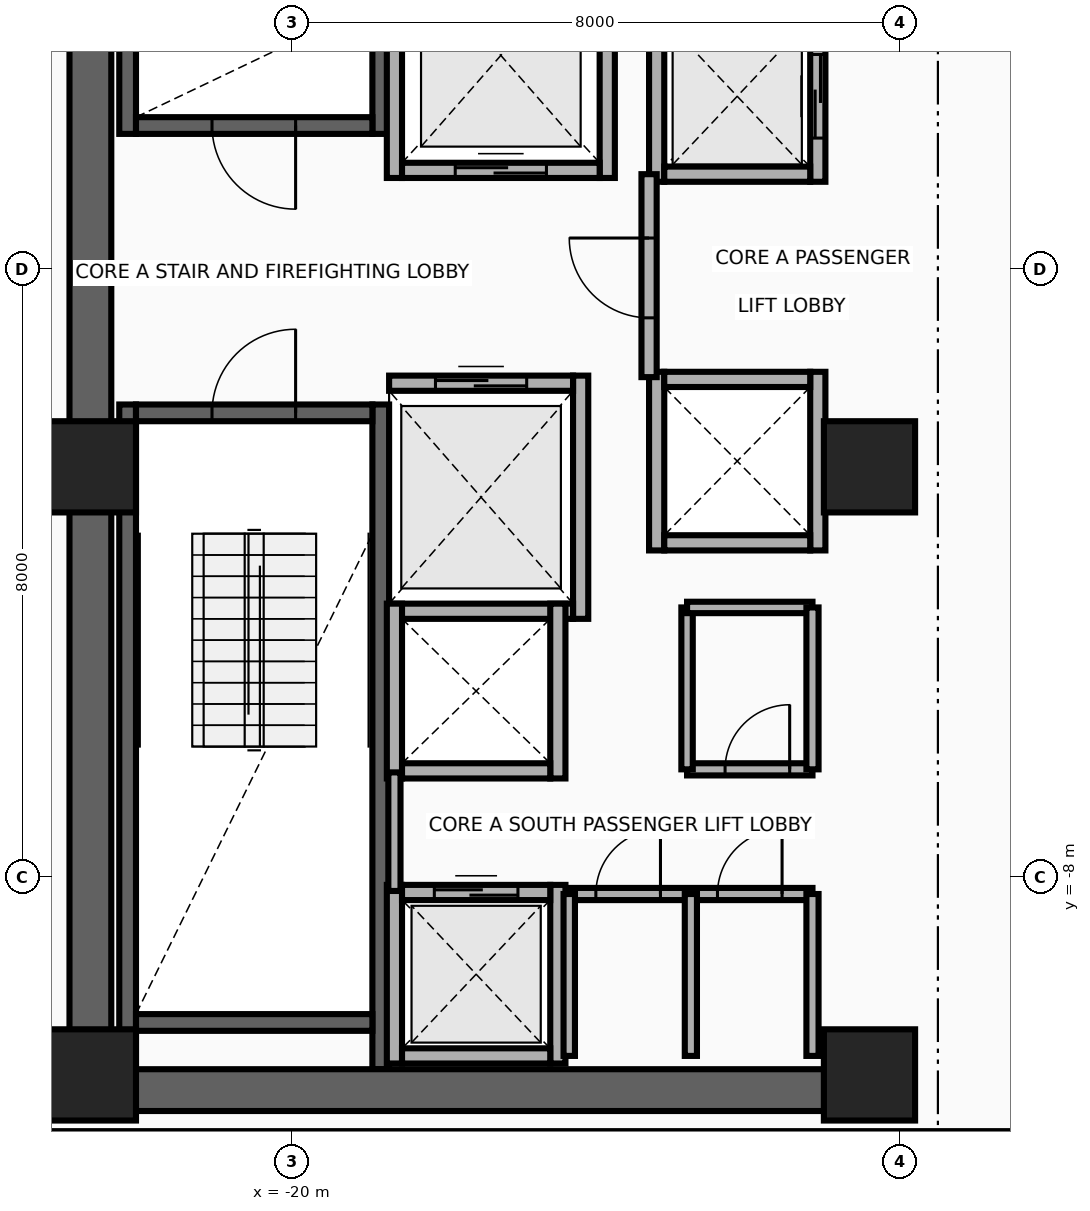
"""IFC4 building model, lengths in metres.
Left out: names, types, materials, properties, quantities, classifications, styles, units other than length and angle.
Written with IfcOpenShell. Run it as: python <this file> out.ifc"""

import sys

from ifc_helpers import new_model, si_unit, direction, frame, frame_2d, origin, origin_2d, place, context, subcontext, project, spatial, rectangle, extrude, source, transform, mapped, element, fill, save


model = new_model("IFC4")
c1 = context("Model", 3, precision=1e-05, world=origin(), true_north=direction((0.0, 1.0)))
c2 = subcontext(c1, "Body", "Model", "MODEL_VIEW")
j1 = project(units=[si_unit("LENGTHUNIT", "METRE"), si_unit("PLANEANGLEUNIT", "RADIAN")], contexts=[c1])
p1 = place(None, origin())
s1 = spatial("IfcSite", under=j1, at=p1, CompositionType="ELEMENT")
p2 = place(p1, origin())
s2 = spatial("IfcBuilding", under=s1, at=p2, CompositionType="ELEMENT")
p3 = place(p2, frame((0.0, 0.0, 168.6)))
s3 = spatial("IfcBuildingStorey", under=s2, at=p3, CompositionType="ELEMENT", Elevation=168.6)
for number, where, z_axis, x_axis in (
    (1, (-22.16, 1.78, 0.0), (0.0, 0.0, 1.0), (0.0, 1.0, 0.0)),
    (2, (-18.83, 1.78, 0.0), (0.0, 0.0, 1.0), (0.0, 1.0, 0.0)),
):
    element("IfcWall", number, at=place(p3, frame(where, z_axis=z_axis, x_axis=x_axis)), inside=s3, PredefinedType="SHEAR", context=c2, shape_type="SweptSolid", body=[
        extrude(rectangle(XDim=8.745, YDim=0.22, at=frame_2d((4.373, 0.0))), origin(), (0.0, 0.0, 1.0), 3.3),
    ])
p4 = place(p3, frame((-22.05, 1.89, 0.0), z_axis=(0.0, 0.0, 1.0), x_axis=(1.0, 0.0, 0.0)))
e3 = element("IfcWall", 3, at=p4, inside=s3, PredefinedType="SHEAR", context=c2, shape_type="SweptSolid", body=[
    extrude(rectangle(XDim=3.11, YDim=0.22, at=frame_2d((1.555, 0.0))), origin(), (0.0, 0.0, 1.0), 3.3),
])
p5 = place(p4, frame((1.0, 0.0, 0.0)))
e4 = element("IfcOpeningElement", 4, at=p5, cuts=e3, PredefinedType="OPENING", context=c2, shape_type="SweptSolid", body=[
    extrude(rectangle(XDim=1.1, YDim=2.15, at=frame_2d((0.55, 1.075))), frame((0.0, 0.125, 0.0), z_axis=(0.0, -1.0, 0.0), x_axis=(1.0, 0.0, 0.0)), (0.0, 0.0, 1.0), 0.25),
])
for number, where, z_axis, x_axis in (
    (5, (-22.16, -10.525, 0.0), (0.0, 0.0, 1.0), (0.0, 1.0, 0.0)),
    (6, (-18.83, -10.525, 0.0), (0.0, 0.0, 1.0), (0.0, 1.0, 0.0)),
):
    element("IfcWall", number, at=place(p3, frame(where, z_axis=z_axis, x_axis=x_axis)), inside=s3, PredefinedType="SHEAR", context=c2, shape_type="SweptSolid", body=[
        extrude(rectangle(XDim=8.745, YDim=0.22, at=frame_2d((4.373, 0.0))), origin(), (0.0, 0.0, 1.0), 3.3),
    ])
p6 = place(p3, frame((-22.05, -9.91, 0.0), z_axis=(0.0, 0.0, 1.0), x_axis=(1.0, 0.0, 0.0)))
e7 = element("IfcWall", 7, at=p6, inside=s3, PredefinedType="SHEAR", context=c2, shape_type="SweptSolid", body=[
    extrude(rectangle(XDim=3.11, YDim=0.22, at=frame_2d((1.555, 0.0))), origin(), (0.0, 0.0, 1.0), 3.3),
])
p7 = place(p3, frame((-22.05, -1.89, 0.0), z_axis=(0.0, 0.0, 1.0), x_axis=(1.0, 0.0, 0.0)))
e8 = element("IfcWall", 8, at=p7, inside=s3, PredefinedType="SHEAR", context=c2, shape_type="SweptSolid", body=[
    extrude(rectangle(XDim=3.11, YDim=0.22, at=frame_2d((1.555, 0.0))), origin(), (0.0, 0.0, 1.0), 3.3),
])
p8 = place(p7, frame((1.0, 0.0, 0.0)))
e9 = element("IfcOpeningElement", 9, at=p8, cuts=e8, PredefinedType="OPENING", context=c2, shape_type="SweptSolid", body=[
    extrude(rectangle(XDim=1.1, YDim=2.15, at=frame_2d((0.55, 1.075))), frame((0.0, 0.125, 0.0), z_axis=(0.0, -1.0, 0.0), x_axis=(1.0, 0.0, 0.0)), (0.0, 0.0, 1.0), 0.25),
])
p9 = place(p3, frame((-22.65, -11.075, 0.0), z_axis=(0.0, 0.0, 1.0), x_axis=(0.0, 1.0, 0.0)))
e10 = element("IfcWall", 10, at=p9, inside=s3, PredefinedType="SHEAR", context=c2, shape_type="SweptSolid", body=[
    extrude(rectangle(XDim=22.15, YDim=0.55, at=frame_2d((11.075, 0.0))), origin(), (0.0, 0.0, 1.0), 3.3),
])
p10 = place(p3, frame((-22.65, -10.8, 0.0), z_axis=(0.0, 0.0, 1.0), x_axis=(1.0, 0.0, 0.0)))
e11 = element("IfcWall", 11, at=p10, inside=s3, PredefinedType="SHEAR", context=c2, shape_type="SweptSolid", body=[
    extrude(rectangle(XDim=10.25, YDim=0.55, at=frame_2d((5.125, 0.0))), origin(), (0.0, 0.0, 1.0), 3.3),
])
m1 = source(origin(), c2, "Body", "SweptSolid", [
    extrude(rectangle(XDim=1.2, YDim=1.2, at=origin_2d()), origin(), (0.0, 0.0, 1.0), 3.7),
])
for number, where, z_axis, x_axis in (
    (12, (-22.65, -10.6, 0.0), (0.0, 0.0, 1.0), (1.0, 0.0, 0.0)),
    (13, (-12.4, -10.6, 0.0), (0.0, 0.0, 1.0), (1.0, 0.0, 0.0)),
    (14, (-22.65, -2.6, 0.0), (0.0, 0.0, 1.0), (1.0, 0.0, 0.0)),
    (15, (-12.4, -2.6, 0.0), (0.0, 0.0, 1.0), (1.0, 0.0, 0.0)),
):
    element("IfcColumn", number, at=place(p3, frame(where, z_axis=z_axis, x_axis=x_axis)), inside=s3, PredefinedType="COLUMN", context=c2, shape_type="MappedRepresentation", body=[
        mapped(m1, transform((0.0, 0.0, 0.0), x_axis=(1.0, 0.0, 0.0), y_axis=(0.0, 1.0, 0.0), z_axis=(0.0, 0.0, 1.0), scale=1.0)),
    ])
for number, where, z_axis, x_axis in (
    (16, (-18.65, 1.2, 0.0), (0.0, 0.0, 1.0), (0.0, 1.0, 0.0)),
    (17, (-15.85, 1.2, 0.0), (0.0, 0.0, 1.0), (0.0, 1.0, 0.0)),
):
    element("IfcWall", number, at=place(p3, frame(where, z_axis=z_axis, x_axis=x_axis)), inside=s3, PredefinedType="MOVABLE", context=c2, shape_type="SweptSolid", body=[
        extrude(rectangle(XDim=3.225, YDim=0.2, at=frame_2d((1.613, 0.0))), origin(), (0.0, 0.0, 1.0), 3.3),
    ])
p11 = place(p3, frame((-18.55, 1.3, 0.0), z_axis=(0.0, 0.0, 1.0), x_axis=(1.0, 0.0, 0.0)))
e18 = element("IfcWall", 18, at=p11, inside=s3, PredefinedType="MOVABLE", context=c2, shape_type="SweptSolid", body=[
    extrude(rectangle(XDim=2.6, YDim=0.2, at=frame_2d((1.3, 0.0))), origin(), (0.0, 0.0, 1.0), 3.3),
])
p12 = place(p11, frame((0.7, 0.0, 0.0)))
e19 = element("IfcOpeningElement", 19, at=p12, cuts=e18, PredefinedType="OPENING", context=c2, shape_type="SweptSolid", body=[
    extrude(rectangle(XDim=1.2, YDim=2.1, at=frame_2d((0.6, 1.05))), frame((0.0, 0.115, 0.0), z_axis=(0.0, -1.0, 0.0), x_axis=(1.0, 0.0, 0.0)), (0.0, 0.0, 1.0), 0.23),
])
p13 = place(p3, frame((-16.2, -4.6, 0.0), z_axis=(0.0, 0.0, 1.0), x_axis=(0.0, 1.0, 0.0)))
e20 = element("IfcWall", 20, at=p13, inside=s3, PredefinedType="MOVABLE", context=c2, shape_type="SweptSolid", body=[
    extrude(rectangle(XDim=3.2, YDim=0.2, at=frame_2d((1.6, 0.0))), origin(), (0.0, 0.0, 1.0), 3.3),
])
p14 = place(p3, frame((-18.72, -4.5, 0.0), z_axis=(0.0, 0.0, 1.0), x_axis=(1.0, 0.0, 0.0)))
e21 = element("IfcWall", 21, at=p14, inside=s3, PredefinedType="MOVABLE", context=c2, shape_type="SweptSolid", body=[
    extrude(rectangle(XDim=2.42, YDim=0.2, at=frame_2d((1.21, 0.0))), origin(), (0.0, 0.0, 1.0), 3.3),
])
p15 = place(p3, frame((-18.72, -1.5, 0.0), z_axis=(0.0, 0.0, 1.0), x_axis=(1.0, 0.0, 0.0)))
e22 = element("IfcWall", 22, at=p15, inside=s3, PredefinedType="MOVABLE", context=c2, shape_type="SweptSolid", body=[
    extrude(rectangle(XDim=2.42, YDim=0.2, at=frame_2d((1.21, 0.0))), origin(), (0.0, 0.0, 1.0), 3.3),
])
p16 = place(p15, frame((0.61, 0.0, 0.0)))
e23 = element("IfcOpeningElement", 23, at=p16, cuts=e22, PredefinedType="OPENING", context=c2, shape_type="SweptSolid", body=[
    extrude(rectangle(XDim=1.2, YDim=2.1, at=frame_2d((0.6, 1.05))), frame((0.0, 0.115, 0.0), z_axis=(0.0, -1.0, 0.0), x_axis=(1.0, 0.0, 0.0)), (0.0, 0.0, 1.0), 0.23),
])
for number, where, z_axis, x_axis in (
    (24, (-18.65, -10.45, 0.0), (0.0, 0.0, 1.0), (0.0, 1.0, 0.0)),
    (25, (-16.5, -10.45, 0.0), (0.0, 0.0, 1.0), (0.0, 1.0, 0.0)),
):
    element("IfcWall", number, at=place(p3, frame(where, z_axis=z_axis, x_axis=x_axis)), inside=s3, PredefinedType="MOVABLE", context=c2, shape_type="SweptSolid", body=[
        extrude(rectangle(XDim=2.35, YDim=0.2, at=frame_2d((1.175, 0.0))), origin(), (0.0, 0.0, 1.0), 2.085),
    ])
p17 = place(p3, frame((-18.55, -10.35, 0.0), z_axis=(0.0, 0.0, 1.0), x_axis=(1.0, 0.0, 0.0)))
e26 = element("IfcWall", 26, at=p17, inside=s3, PredefinedType="MOVABLE", context=c2, shape_type="SweptSolid", body=[
    extrude(rectangle(XDim=1.95, YDim=0.2, at=frame_2d((0.975, 0.0))), origin(), (0.0, 0.0, 1.0), 2.085),
])
p18 = place(p3, frame((-18.55, -8.2, 0.0), z_axis=(0.0, 0.0, 1.0), x_axis=(1.0, 0.0, 0.0)))
e27 = element("IfcWall", 27, at=p18, inside=s3, PredefinedType="MOVABLE", context=c2, shape_type="SweptSolid", body=[
    extrude(rectangle(XDim=1.95, YDim=0.2, at=frame_2d((0.975, 0.0))), origin(), (0.0, 0.0, 1.0), 3.3),
])
p19 = place(p18, frame((0.425, 0.0, 0.0)))
e28 = element("IfcOpeningElement", 28, at=p19, cuts=e27, PredefinedType="OPENING", context=c2, shape_type="SweptSolid", body=[
    extrude(rectangle(XDim=1.1, YDim=2.1, at=frame_2d((0.55, 1.05))), frame((0.0, 0.115, 0.0), z_axis=(0.0, -1.0, 0.0), x_axis=(1.0, 0.0, 0.0)), (0.0, 0.0, 1.0), 0.23),
])
p20 = place(p3, frame((-15.2, 1.15, 0.0), z_axis=(0.0, 0.0, 1.0), x_axis=(0.0, 1.0, 0.0)))
e29 = element("IfcWall", 29, at=p20, inside=s3, PredefinedType="MOVABLE", context=c2, shape_type="SweptSolid", body=[
    extrude(rectangle(XDim=2.25, YDim=0.2, at=frame_2d((1.125, 0.0))), origin(), (0.0, 0.0, 1.0), 3.3),
])
p21 = place(p3, frame((-13.08, 1.15, 0.0), z_axis=(0.0, 0.0, 1.0), x_axis=(0.0, 1.0, 0.0)))
e30 = element("IfcWall", 30, at=p21, inside=s3, PredefinedType="MOVABLE", context=c2, shape_type="SweptSolid", body=[
    extrude(rectangle(XDim=2.25, YDim=0.2, at=frame_2d((1.125, 0.0))), origin(), (0.0, 0.0, 1.0), 3.3),
])
p22 = place(p21, frame((0.575, 0.0, 0.0)))
e31 = element("IfcOpeningElement", 31, at=p22, cuts=e30, PredefinedType="OPENING", context=c2, shape_type="SweptSolid", body=[
    extrude(rectangle(XDim=1.1, YDim=2.1, at=frame_2d((0.55, 1.05))), frame((0.0, 0.115, 0.0), z_axis=(0.0, -1.0, 0.0), x_axis=(1.0, 0.0, 0.0)), (0.0, 0.0, 1.0), 0.23),
])
p23 = place(p3, frame((-15.1, 1.25, 0.0), z_axis=(0.0, 0.0, 1.0), x_axis=(1.0, 0.0, 0.0)))
e32 = element("IfcWall", 32, at=p23, inside=s3, PredefinedType="MOVABLE", context=c2, shape_type="SweptSolid", body=[
    extrude(rectangle(XDim=1.92, YDim=0.2, at=frame_2d((0.96, 0.0))), origin(), (0.0, 0.0, 1.0), 3.3),
])
for number, where, z_axis, x_axis in (
    (33, (-18.65, -6.7, 0.0), (0.0, 0.0, 1.0), (0.0, 1.0, 0.0)),
    (34, (-16.5, -6.7, 0.0), (0.0, 0.0, 1.0), (0.0, 1.0, 0.0)),
):
    element("IfcWall", number, at=place(p3, frame(where, z_axis=z_axis, x_axis=x_axis)), inside=s3, PredefinedType="MOVABLE", context=c2, shape_type="SweptSolid", body=[
        extrude(rectangle(XDim=2.3, YDim=0.2, at=frame_2d((1.15, 0.0))), origin(), (0.0, 0.0, 1.0), 3.3),
    ])
p24 = place(p3, frame((-18.55, -6.6, 0.0), z_axis=(0.0, 0.0, 1.0), x_axis=(1.0, 0.0, 0.0)))
e35 = element("IfcWall", 35, at=p24, inside=s3, PredefinedType="MOVABLE", context=c2, shape_type="SweptSolid", body=[
    extrude(rectangle(XDim=1.95, YDim=0.2, at=frame_2d((0.975, 0.0))), origin(), (0.0, 0.0, 1.0), 3.3),
])
for number, where, z_axis, x_axis in (
    (36, (-15.2, -3.7, 0.0), (0.0, 0.0, 1.0), (0.0, 1.0, 0.0)),
    (37, (-13.08, -3.7, 0.0), (0.0, 0.0, 1.0), (0.0, 1.0, 0.0)),
):
    element("IfcWall", number, at=place(p3, frame(where, z_axis=z_axis, x_axis=x_axis)), inside=s3, PredefinedType="MOVABLE", context=c2, shape_type="SweptSolid", body=[
        extrude(rectangle(XDim=2.35, YDim=0.2, at=frame_2d((1.175, 0.0))), origin(), (0.0, 0.0, 1.0), 3.3),
    ])
for number, where, z_axis, x_axis in (
    (38, (-15.1, -3.6, 0.0), (0.0, 0.0, 1.0), (1.0, 0.0, 0.0)),
    (39, (-15.1, -1.45, 0.0), (0.0, 0.0, 1.0), (1.0, 0.0, 0.0)),
):
    element("IfcWall", number, at=place(p3, frame(where, z_axis=z_axis, x_axis=x_axis)), inside=s3, PredefinedType="MOVABLE", context=c2, shape_type="SweptSolid", body=[
        extrude(rectangle(XDim=1.92, YDim=0.2, at=frame_2d((0.96, 0.0))), origin(), (0.0, 0.0, 1.0), 3.3),
    ])
p25 = place(p3, frame((-15.3, -1.42, 0.0), z_axis=(0.0, 0.0, 1.0), x_axis=(0.0, 1.0, 0.0)))
e40 = element("IfcWall", 40, at=p25, inside=s3, PredefinedType="PARTITIONING", context=c2, shape_type="SweptSolid", body=[
    extrude(rectangle(XDim=2.67, YDim=0.2, at=frame_2d((1.335, 0.0))), origin(), (0.0, 0.0, 1.0), 3.3),
])
p26 = place(p25, frame((0.78, 0.0, 0.0)))
e41 = element("IfcOpeningElement", 41, at=p26, cuts=e40, PredefinedType="OPENING", context=c2, shape_type="SweptSolid", body=[
    extrude(rectangle(XDim=1.05, YDim=2.15, at=frame_2d((0.525, 1.075))), frame((0.0, 0.115, 0.0), z_axis=(0.0, -1.0, 0.0), x_axis=(1.0, 0.0, 0.0)), (0.0, 0.0, 1.0), 0.23),
])
p27 = place(p3, frame((-18.65, -8.18, 0.0), z_axis=(0.0, 0.0, 1.0), x_axis=(0.0, 1.0, 0.0)))
e42 = element("IfcWall", 42, at=p27, inside=s3, PredefinedType="PARTITIONING", context=c2, shape_type="SweptSolid", body=[
    extrude(rectangle(XDim=1.56, YDim=0.16, at=frame_2d((0.78, 0.0))), origin(), (0.0, 0.0, 1.0), 3.3),
])
p28 = place(p3, frame((-16.35, -8.22, 0.0), z_axis=(0.0, 0.0, 1.0), x_axis=(1.0, 0.0, 0.0)))
e43 = element("IfcWall", 43, at=p28, inside=s3, PredefinedType="PARTITIONING", context=c2, shape_type="SweptSolid", body=[
    extrude(rectangle(XDim=3.2, YDim=0.16, at=frame_2d((1.6, 0.0))), origin(), (0.0, 0.0, 1.0), 3.3),
])
p29 = place(p28, frame((0.35, 0.0, 0.0)))
e44 = element("IfcOpeningElement", 44, at=p29, cuts=e43, PredefinedType="OPENING", context=c2, shape_type="SweptSolid", body=[
    extrude(rectangle(XDim=0.85, YDim=2.05, at=frame_2d((0.425, 1.025))), frame((0.0, 0.095, 0.0), z_axis=(0.0, -1.0, 0.0), x_axis=(1.0, 0.0, 0.0)), (0.0, 0.0, 1.0), 0.19),
])
p30 = place(p28, frame((1.95, 0.0, 0.0)))
e45 = element("IfcOpeningElement", 45, at=p30, cuts=e43, PredefinedType="OPENING", context=c2, shape_type="SweptSolid", body=[
    extrude(rectangle(XDim=0.85, YDim=2.05, at=frame_2d((0.425, 1.025))), frame((0.0, 0.095, 0.0), z_axis=(0.0, -1.0, 0.0), x_axis=(1.0, 0.0, 0.0)), (0.0, 0.0, 1.0), 0.19),
])
p31 = place(p3, frame((-16.35, -10.35, 0.0), z_axis=(0.0, 0.0, 1.0), x_axis=(0.0, 1.0, 0.0)))
e46 = element("IfcWall", 46, at=p31, inside=s3, PredefinedType="PARTITIONING", context=c2, shape_type="SweptSolid", body=[
    extrude(rectangle(XDim=2.13, YDim=0.15, at=frame_2d((1.065, 0.0))), origin(), (0.0, 0.0, 1.0), 2.085),
])
for number, where, z_axis, x_axis in (
    (47, (-13.15, -10.35, 0.0), (0.0, 0.0, 1.0), (0.0, 1.0, 0.0)),
    (48, (-14.75, -10.35, 0.0), (0.0, 0.0, 1.0), (0.0, 1.0, 0.0)),
):
    element("IfcWall", number, at=place(p3, frame(where, z_axis=z_axis, x_axis=x_axis)), inside=s3, PredefinedType="PARTITIONING", context=c2, shape_type="SweptSolid", body=[
        extrude(rectangle(XDim=2.13, YDim=0.16, at=frame_2d((1.065, 0.0))), origin(), (0.0, 0.0, 1.0), 2.085),
    ])
p32 = place(p3, frame((-14.8, -6.58, 0.0), z_axis=(0.0, 0.0, 1.0), x_axis=(1.0, 0.0, 0.0)))
e49 = element("IfcWall", 49, at=p32, inside=s3, PredefinedType="PARTITIONING", context=c2, shape_type="SweptSolid", body=[
    extrude(rectangle(XDim=1.65, YDim=0.16, at=frame_2d((0.825, 0.0))), origin(), (0.0, 0.0, 1.0), 3.3),
])
p33 = place(p32, frame((0.5, 0.0, 0.0)))
e50 = element("IfcOpeningElement", 50, at=p33, cuts=e49, PredefinedType="OPENING", context=c2, shape_type="SweptSolid", body=[
    extrude(rectangle(XDim=0.85, YDim=2.05, at=frame_2d((0.425, 1.025))), frame((0.0, 0.095, 0.0), z_axis=(0.0, -1.0, 0.0), x_axis=(1.0, 0.0, 0.0)), (0.0, 0.0, 1.0), 0.19),
])
p34 = place(p3, frame((-14.8, -6.58, 0.0), z_axis=(0.0, 0.0, 1.0), x_axis=(0.0, 1.0, 0.0)))
e51 = element("IfcWall", 51, at=p34, inside=s3, PredefinedType="PARTITIONING", context=c2, shape_type="SweptSolid", body=[
    extrude(rectangle(XDim=2.13, YDim=0.15, at=frame_2d((1.065, 0.0))), origin(), (0.0, 0.0, 1.0), 3.3),
])
p35 = place(p3, frame((-14.8, -4.45, 0.0), z_axis=(0.0, 0.0, 1.0), x_axis=(1.0, 0.0, 0.0)))
e52 = element("IfcWall", 52, at=p35, inside=s3, PredefinedType="PARTITIONING", context=c2, shape_type="SweptSolid", body=[
    extrude(rectangle(XDim=1.65, YDim=0.15, at=frame_2d((0.825, 0.0))), origin(), (0.0, 0.0, 1.0), 3.3),
])
p36 = place(p3, frame((-13.15, -6.58, 0.0), z_axis=(0.0, 0.0, 1.0), x_axis=(0.0, 1.0, 0.0)))
e53 = element("IfcWall", 53, at=p36, inside=s3, PredefinedType="PARTITIONING", context=c2, shape_type="SweptSolid", body=[
    extrude(rectangle(XDim=2.13, YDim=0.16, at=frame_2d((1.065, 0.0))), origin(), (0.0, 0.0, 1.0), 3.3),
])
p37 = place(p3, frame((-23.45, -11.42, 0.0), z_axis=(0.0, 0.0, 1.0), x_axis=(1.0, 0.0, 0.0)))
e54 = element("IfcWall", 54, at=p37, inside=s3, PredefinedType="PARTITIONING", context=c2, shape_type="SweptSolid", body=[
    extrude(rectangle(XDim=13.84, YDim=0.16, at=frame_2d((6.92, 0.0))), origin(), (0.0, 0.0, 1.0), 2.674),
])
p38 = place(p12, origin())
e55 = element("IfcDoor", 55, at=p38, inside=s3, OperationType="DOUBLE_DOOR_SLIDING", PredefinedType="DOOR", context=c2, shape_type="SweptSolid", body=[
    extrude(rectangle(XDim=1.2, YDim=2.1, at=frame_2d((0.6, 1.05))), frame((0.0, 0.025, 0.0), z_axis=(0.0, -1.0, 0.0), x_axis=(1.0, 0.0, 0.0)), (0.0, 0.0, 1.0), 0.05),
])
fill(e19, e55)
p39 = place(p16, origin())
e56 = element("IfcDoor", 56, at=p39, inside=s3, OperationType="DOUBLE_DOOR_SLIDING", PredefinedType="DOOR", context=c2, shape_type="SweptSolid", body=[
    extrude(rectangle(XDim=1.2, YDim=2.1, at=frame_2d((0.6, 1.05))), frame((0.0, 0.025, 0.0), z_axis=(0.0, -1.0, 0.0), x_axis=(1.0, 0.0, 0.0)), (0.0, 0.0, 1.0), 0.05),
])
fill(e23, e56)
p40 = place(p19, origin())
e57 = element("IfcDoor", 57, at=p40, inside=s3, OperationType="DOUBLE_DOOR_SLIDING", PredefinedType="DOOR", context=c2, shape_type="SweptSolid", body=[
    extrude(rectangle(XDim=1.1, YDim=2.1, at=frame_2d((0.55, 1.05))), frame((0.0, 0.025, 0.0), z_axis=(0.0, -1.0, 0.0), x_axis=(1.0, 0.0, 0.0)), (0.0, 0.0, 1.0), 0.05),
])
fill(e28, e57)
p41 = place(p22, origin())
e58 = element("IfcDoor", 58, at=p41, inside=s3, OperationType="DOUBLE_DOOR_SLIDING", PredefinedType="DOOR", context=c2, shape_type="SweptSolid", body=[
    extrude(rectangle(XDim=1.1, YDim=2.1, at=frame_2d((0.55, 1.05))), frame((0.0, 0.025, 0.0), z_axis=(0.0, -1.0, 0.0), x_axis=(1.0, 0.0, 0.0)), (0.0, 0.0, 1.0), 0.05),
])
fill(e31, e58)
p42 = place(p26, origin())
e59 = element("IfcDoor", 59, at=p42, inside=s3, OperationType="SINGLE_SWING_RIGHT", PredefinedType="DOOR", context=c2, shape_type="SweptSolid", body=[
    extrude(rectangle(XDim=1.05, YDim=2.15, at=frame_2d((0.525, 1.075))), frame((0.0, 0.025, 0.0), z_axis=(0.0, -1.0, 0.0), x_axis=(1.0, 0.0, 0.0)), (0.0, 0.0, 1.0), 0.05),
])
fill(e41, e59)
p43 = place(p5, frame((1.1, 0.0, 0.0), z_axis=(0.0, 0.0, 1.0), x_axis=(-1.0, 0.0, 0.0)))
e60 = element("IfcDoor", 60, at=p43, inside=s3, OperationType="SINGLE_SWING_LEFT", PredefinedType="DOOR", context=c2, shape_type="SweptSolid", body=[
    extrude(rectangle(XDim=1.1, YDim=2.15, at=frame_2d((0.55, 1.075))), frame((0.0, 0.025, 0.0), z_axis=(0.0, -1.0, 0.0), x_axis=(1.0, 0.0, 0.0)), (0.0, 0.0, 1.0), 0.05),
])
fill(e4, e60)
p44 = place(p8, origin())
e61 = element("IfcDoor", 61, at=p44, inside=s3, OperationType="SINGLE_SWING_RIGHT", PredefinedType="DOOR", context=c2, shape_type="SweptSolid", body=[
    extrude(rectangle(XDim=1.1, YDim=2.15, at=frame_2d((0.55, 1.075))), frame((0.0, 0.025, 0.0), z_axis=(0.0, -1.0, 0.0), x_axis=(1.0, 0.0, 0.0)), (0.0, 0.0, 1.0), 0.05),
])
fill(e9, e61)
p45 = place(p29, origin())
e62 = element("IfcDoor", 62, at=p45, inside=s3, OperationType="SINGLE_SWING_LEFT", PredefinedType="DOOR", context=c2, shape_type="SweptSolid", body=[
    extrude(rectangle(XDim=0.85, YDim=2.05, at=frame_2d((0.425, 1.025))), frame((0.0, 0.025, 0.0), z_axis=(0.0, -1.0, 0.0), x_axis=(1.0, 0.0, 0.0)), (0.0, 0.0, 1.0), 0.05),
])
fill(e44, e62)
p46 = place(p30, origin())
e63 = element("IfcDoor", 63, at=p46, inside=s3, OperationType="SINGLE_SWING_RIGHT", PredefinedType="DOOR", context=c2, shape_type="SweptSolid", body=[
    extrude(rectangle(XDim=0.85, YDim=2.05, at=frame_2d((0.425, 1.025))), frame((0.0, 0.025, 0.0), z_axis=(0.0, -1.0, 0.0), x_axis=(1.0, 0.0, 0.0)), (0.0, 0.0, 1.0), 0.05),
])
fill(e45, e63)
p47 = place(p33, origin())
e64 = element("IfcDoor", 64, at=p47, inside=s3, OperationType="SINGLE_SWING_LEFT", PredefinedType="DOOR", context=c2, shape_type="SweptSolid", body=[
    extrude(rectangle(XDim=0.85, YDim=2.05, at=frame_2d((0.425, 1.025))), frame((0.0, 0.025, 0.0), z_axis=(0.0, -1.0, 0.0), x_axis=(1.0, 0.0, 0.0)), (0.0, 0.0, 1.0), 0.05),
])
fill(e50, e64)
save(model, sys.argv[1])
